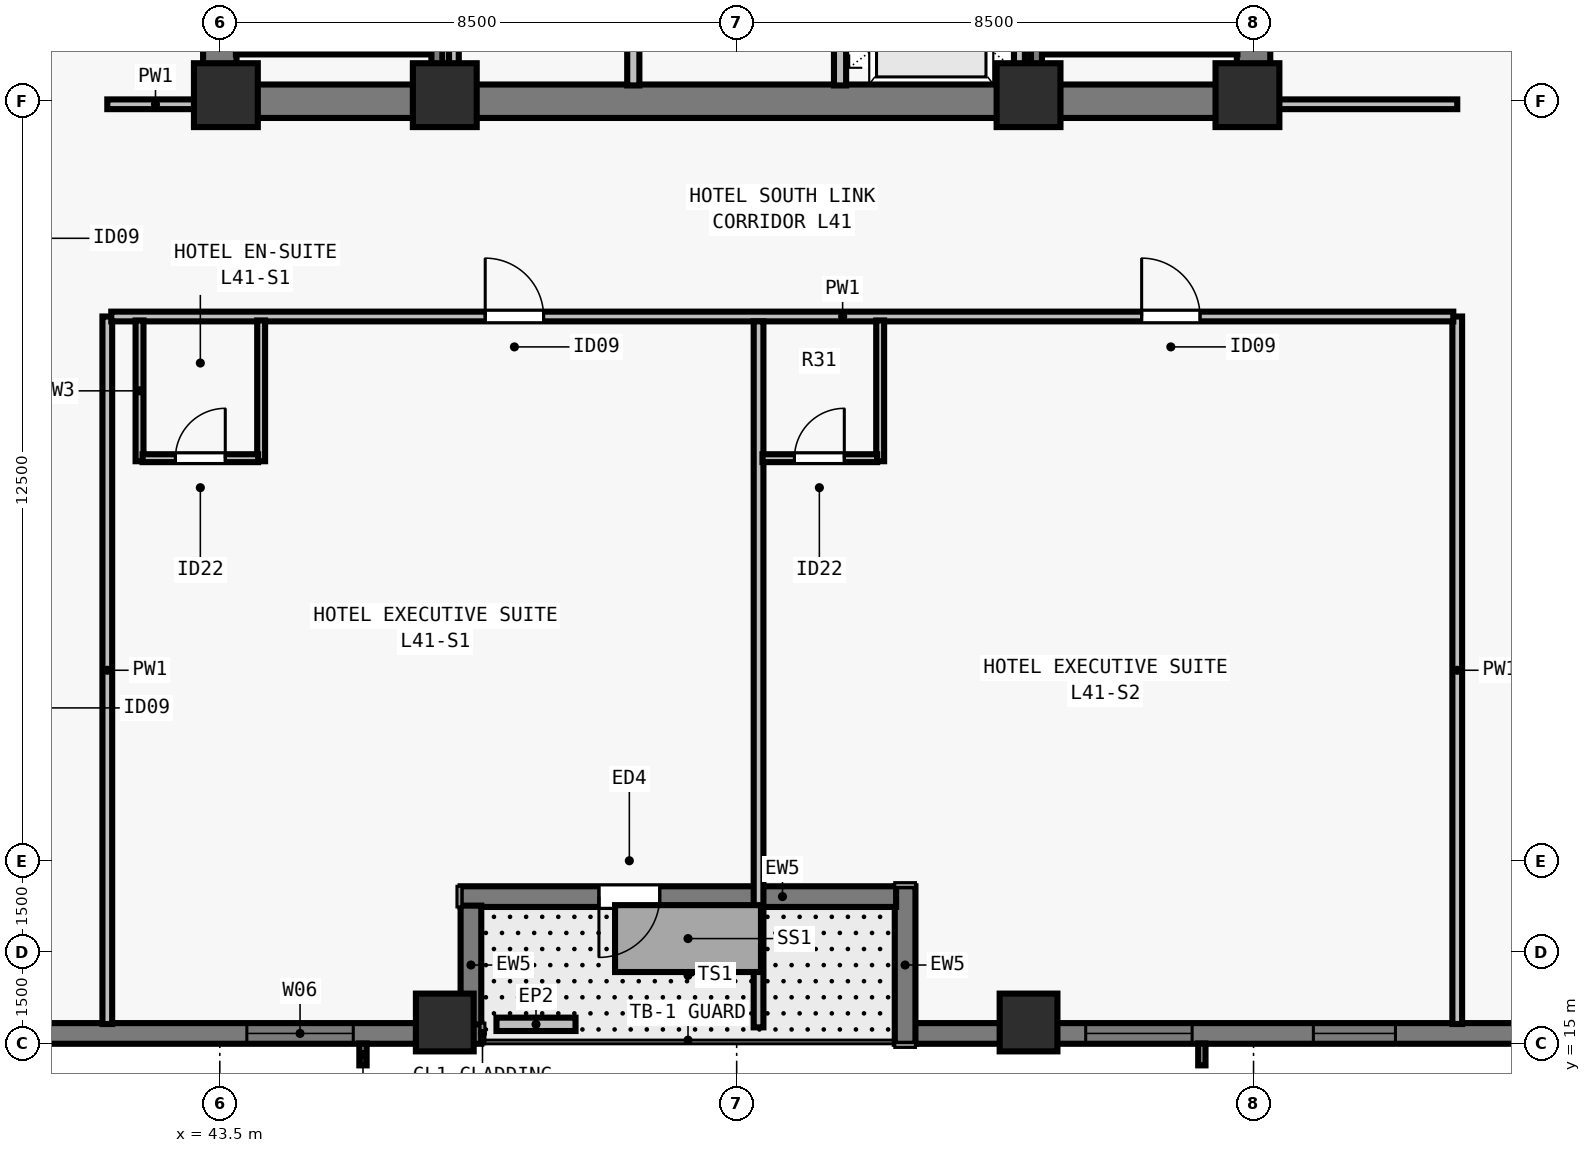
"""IFC4 building model, lengths in metres.
Left out: names, types, materials, properties, quantities, classifications, styles, units other than length and angle.
Written with IfcOpenShell. Run it as: python <this file> out.ifc"""

import sys

from ifc_helpers import new_model, si_unit, direction, frame, frame_2d, origin, origin_2d, place, context, subcontext, project, spatial, rectangle, extrude, element, fill, save


model = new_model("IFC4")
c1 = context("Model", 3, precision=1e-05, world=origin(), true_north=direction((0.0, 1.0)))
c2 = subcontext(c1, "Body", "Model", "MODEL_VIEW")
j1 = project(units=[si_unit("LENGTHUNIT", "METRE"), si_unit("PLANEANGLEUNIT", "RADIAN")], contexts=[c1])
p1 = place(None, origin())
s1 = spatial("IfcSite", under=j1, at=p1, CompositionType="ELEMENT")
p2 = place(p1, origin())
s2 = spatial("IfcBuilding", under=s1, at=p2, CompositionType="ELEMENT")
p3 = place(p2, frame((0.0, 0.0, 151.5)))
s3 = spatial("IfcBuildingStorey", under=s2, at=p3, CompositionType="ELEMENT", Elevation=151.5)
for number, where, z_axis, x_axis in (
    (1, (43.6, 30.6, 0.0), (0.0, 0.0, 1.0), (1.0, 0.0, 0.0)),
    (2, (47.2, 30.6, 0.0), (0.0, 0.0, 1.0), (1.0, 0.0, 0.0)),
    (3, (56.8, 30.6, 0.0), (0.0, 0.0, 1.0), (1.0, 0.0, 0.0)),
    (4, (60.4, 30.6, 0.0), (0.0, 0.0, 1.0), (1.0, 0.0, 0.0)),
):
    element("IfcColumn", number, at=place(p3, frame(where, z_axis=z_axis, x_axis=x_axis)), inside=s3, PredefinedType="COLUMN", context=c2, shape_type="SweptSolid", body=[
        extrude(rectangle(XDim=1.05, YDim=1.05, at=origin_2d()), origin(), (0.0, 0.0, 1.0), 3.5),
    ])
for number, where, z_axis, x_axis in (
    (5, (47.2, 15.35, 0.0), (0.0, 0.0, 1.0), (1.0, 0.0, 0.0)),
    (6, (56.8, 15.35, 0.0), (0.0, 0.0, 1.0), (1.0, 0.0, 0.0)),
):
    element("IfcColumn", number, at=place(p3, frame(where, z_axis=z_axis, x_axis=x_axis)), inside=s3, PredefinedType="COLUMN", context=c2, shape_type="SweptSolid", body=[
        extrude(rectangle(XDim=0.95, YDim=0.95, at=origin_2d()), origin(), (0.0, 0.0, 1.0), 3.5),
    ])
p4 = place(p3, frame((47.8, 15.17, 0.0), z_axis=(0.0, 0.0, 1.0), x_axis=(-1.0, 0.0, 0.0)))
e7 = element("IfcWall", 7, at=p4, inside=s3, PredefinedType="SOLIDWALL", context=c2, shape_type="SweptSolid", body=[
    extrude(rectangle(XDim=15.482, YDim=0.34, at=frame_2d((7.741, 0.0))), origin(), (0.0, 0.0, 1.0), 3.28),
])
p5 = place(p4, frame((2.105, 0.0, 0.8)))
e8 = element("IfcOpeningElement", 8, at=p5, cuts=e7, PredefinedType="OPENING", context=c2, shape_type="SweptSolid", body=[
    extrude(rectangle(XDim=1.75, YDim=1.66, at=frame_2d((0.875, 0.83))), frame((0.0, 0.18, 0.0), z_axis=(0.0, -1.0, 0.0), x_axis=(1.0, 0.0, 0.0)), (0.0, 0.0, 1.0), 0.36),
])
p6 = place(p4, frame((8.63, 0.0, 0.8)))
e9 = element("IfcOpeningElement", 9, at=p6, cuts=e7, PredefinedType="OPENING", context=c2, shape_type="SweptSolid", body=[
    extrude(rectangle(XDim=0.9, YDim=1.66, at=frame_2d((0.45, 0.83))), frame((0.0, 0.18, 0.0), z_axis=(0.0, -1.0, 0.0), x_axis=(1.0, 0.0, 0.0)), (0.0, 0.0, 1.0), 0.36),
])
p7 = place(p3, frame((72.0, 15.17, 0.0), z_axis=(0.0, 0.0, 1.0), x_axis=(-1.0, 0.0, 0.0)))
e10 = element("IfcWall", 10, at=p7, inside=s3, PredefinedType="SOLIDWALL", context=c2, shape_type="SweptSolid", body=[
    extrude(rectangle(XDim=17.082, YDim=0.34, at=frame_2d((8.541, 0.0))), origin(), (0.0, 0.0, 1.0), 3.28),
])
p8 = place(p7, frame((9.166, 0.0, 0.8)))
e11 = element("IfcOpeningElement", 11, at=p8, cuts=e10, PredefinedType="OPENING", context=c2, shape_type="SweptSolid", body=[
    extrude(rectangle(XDim=1.35, YDim=1.66, at=frame_2d((0.675, 0.83))), frame((0.0, 0.18, 0.0), z_axis=(0.0, -1.0, 0.0), x_axis=(1.0, 0.0, 0.0)), (0.0, 0.0, 1.0), 0.36),
])
p9 = place(p7, frame((12.51, 0.0, 0.8)))
e12 = element("IfcOpeningElement", 12, at=p9, cuts=e10, PredefinedType="OPENING", context=c2, shape_type="SweptSolid", body=[
    extrude(rectangle(XDim=1.75, YDim=1.66, at=frame_2d((0.875, 0.83))), frame((0.0, 0.18, 0.0), z_axis=(0.0, -1.0, 0.0), x_axis=(1.0, 0.0, 0.0)), (0.0, 0.0, 1.0), 0.36),
])
p10 = place(p3, frame((54.77, 15.0, 0.0), z_axis=(0.0, 0.0, 1.0), x_axis=(0.0, 1.0, 0.0)))
e13 = element("IfcWall", 13, at=p10, inside=s3, PredefinedType="SOLIDWALL", context=c2, shape_type="SweptSolid", body=[
    extrude(rectangle(XDim=2.59, YDim=0.34, at=frame_2d((1.295, 0.0))), origin(), (0.0, 0.0, 1.0), 3.28),
])
p11 = place(p3, frame((54.622, 17.42, 0.0), z_axis=(0.0, 0.0, 1.0), x_axis=(-1.0, 0.0, 0.0)))
e14 = element("IfcWall", 14, at=p11, inside=s3, PredefinedType="SOLIDWALL", context=c2, shape_type="SweptSolid", body=[
    extrude(rectangle(XDim=7.162, YDim=0.34, at=frame_2d((3.581, 0.0))), origin(), (0.0, 0.0, 1.0), 3.28),
])
p12 = place(p11, frame((3.887, 0.0, 0.0)))
e15 = element("IfcOpeningElement", 15, at=p12, cuts=e14, PredefinedType="OPENING", context=c2, shape_type="SweptSolid", body=[
    extrude(rectangle(XDim=1.0, YDim=2.15, at=frame_2d((0.5, 1.075))), frame((0.0, 0.18, 0.0), z_axis=(0.0, -1.0, 0.0), x_axis=(1.0, 0.0, 0.0)), (0.0, 0.0, 1.0), 0.36),
])
p13 = place(p3, frame((47.63, 17.272, 0.0), z_axis=(0.0, 0.0, 1.0), x_axis=(0.0, -1.0, 0.0)))
e16 = element("IfcWall", 16, at=p13, inside=s3, PredefinedType="SOLIDWALL", context=c2, shape_type="SweptSolid", body=[
    extrude(rectangle(XDim=1.954, YDim=0.34, at=frame_2d((0.977, 0.0))), origin(), (0.0, 0.0, 1.0), 3.28),
])
p14 = place(p3, frame((48.05, 15.32, 0.0), z_axis=(0.0, 0.0, 1.0), x_axis=(1.0, 0.0, 0.0)))
e17 = element("IfcWall", 17, at=p14, inside=s3, PredefinedType="PARAPET", context=c2, shape_type="SweptSolid", body=[
    extrude(rectangle(XDim=1.3, YDim=0.22, at=frame_2d((0.65, 0.0))), origin(), (0.0, 0.0, 1.0), 0.55),
])
p15 = place(p3, frame((43.225, 30.5, 0.0), z_axis=(0.0, 0.0, 1.0), x_axis=(1.0, 0.0, 0.0)))
e18 = element("IfcWall", 18, at=p15, inside=s3, PredefinedType="SHEAR", context=c2, shape_type="SweptSolid", body=[
    extrude(rectangle(XDim=17.55, YDim=0.55, at=frame_2d((8.775, 0.0))), origin(), (0.0, 0.0, 1.0), 3.28),
])
for number, where, z_axis, x_axis in (
    (19, (43.5, 30.765, 0.0), (0.0, 0.0, 1.0), (0.0, 1.0, 0.0)),
    (20, (60.5, 30.765, 0.0), (0.0, 0.0, 1.0), (0.0, 1.0, 0.0)),
):
    element("IfcWall", number, at=place(p3, frame(where, z_axis=z_axis, x_axis=x_axis)), inside=s3, PredefinedType="SHEAR", context=c2, shape_type="SweptSolid", body=[
        extrude(rectangle(XDim=7.985, YDim=0.55, at=frame_2d((3.993, 0.0))), origin(), (0.0, 0.0, 1.0), 3.28),
    ])
p16 = place(p3, frame((50.3, 30.76, 0.0), z_axis=(0.0, 0.0, 1.0), x_axis=(0.0, 1.0, 0.0)))
e21 = element("IfcWall", 21, at=p16, inside=s3, PredefinedType="SOLIDWALL", context=c2, shape_type="SweptSolid", body=[
    extrude(rectangle(XDim=7.855, YDim=0.2, at=frame_2d((3.927, 0.0))), origin(), (0.0, 0.0, 1.0), 3.28),
])
p17 = place(p16, frame((1.34, 0.0, 0.0)))
e22 = element("IfcOpeningElement", 22, at=p17, cuts=e21, PredefinedType="OPENING", context=c2, shape_type="SweptSolid", body=[
    extrude(rectangle(XDim=0.9, YDim=2.12, at=frame_2d((0.45, 1.06))), frame((0.0, 0.11, 0.0), z_axis=(0.0, -1.0, 0.0), x_axis=(1.0, 0.0, 0.0)), (0.0, 0.0, 1.0), 0.22),
])
p18 = place(p16, frame((5.34, 0.0, 0.0)))
e23 = element("IfcOpeningElement", 23, at=p18, cuts=e21, PredefinedType="OPENING", context=c2, shape_type="SweptSolid", body=[
    extrude(rectangle(XDim=0.9, YDim=2.12, at=frame_2d((0.45, 1.06))), frame((0.0, 0.11, 0.0), z_axis=(0.0, -1.0, 0.0), x_axis=(1.0, 0.0, 0.0)), (0.0, 0.0, 1.0), 0.22),
])
p19 = place(p3, frame((53.7, 30.76, 0.0), z_axis=(0.0, 0.0, 1.0), x_axis=(0.0, 1.0, 0.0)))
e24 = element("IfcWall", 24, at=p19, inside=s3, PredefinedType="SOLIDWALL", context=c2, shape_type="SweptSolid", body=[
    extrude(rectangle(XDim=7.855, YDim=0.2, at=frame_2d((3.927, 0.0))), origin(), (0.0, 0.0, 1.0), 3.28),
])
p20 = place(p19, frame((0.79, 0.0, 0.0)))
e25 = element("IfcOpeningElement", 25, at=p20, cuts=e24, PredefinedType="OPENING", context=c2, shape_type="SweptSolid", body=[
    extrude(rectangle(XDim=1.1, YDim=2.2, at=frame_2d((0.55, 1.1))), frame((0.0, 0.11, 0.0), z_axis=(0.0, -1.0, 0.0), x_axis=(1.0, 0.0, 0.0)), (0.0, 0.0, 1.0), 0.22),
])
p21 = place(p19, frame((3.49, 0.0, 0.0)))
e26 = element("IfcOpeningElement", 26, at=p21, cuts=e24, PredefinedType="OPENING", context=c2, shape_type="SweptSolid", body=[
    extrude(rectangle(XDim=1.1, YDim=2.2, at=frame_2d((0.55, 1.1))), frame((0.0, 0.11, 0.0), z_axis=(0.0, -1.0, 0.0), x_axis=(1.0, 0.0, 0.0)), (0.0, 0.0, 1.0), 0.22),
])
p22 = place(p19, frame((6.19, 0.0, 0.0)))
e27 = element("IfcOpeningElement", 27, at=p22, cuts=e24, PredefinedType="OPENING", context=c2, shape_type="SweptSolid", body=[
    extrude(rectangle(XDim=1.1, YDim=2.2, at=frame_2d((0.55, 1.1))), frame((0.0, 0.11, 0.0), z_axis=(0.0, -1.0, 0.0), x_axis=(1.0, 0.0, 0.0)), (0.0, 0.0, 1.0), 0.22),
])
p23 = place(p3, frame((47.35, 30.76, 0.0), z_axis=(0.0, 0.0, 1.0), x_axis=(0.0, 1.0, 0.0)))
e28 = element("IfcWall", 28, at=p23, inside=s3, PredefinedType="PARTITIONING", context=c2, shape_type="SweptSolid", body=[
    extrude(rectangle(XDim=7.855, YDim=0.16, at=frame_2d((3.927, 0.0))), origin(), (0.0, 0.0, 1.0), 3.28),
])
p24 = place(p3, frame((56.65, 30.76, 0.0), z_axis=(0.0, 0.0, 1.0), x_axis=(0.0, 1.0, 0.0)))
e29 = element("IfcWall", 29, at=p24, inside=s3, PredefinedType="SOLIDWALL", context=c2, shape_type="SweptSolid", body=[
    extrude(rectangle(XDim=7.855, YDim=0.18, at=frame_2d((3.927, 0.0))), origin(), (0.0, 0.0, 1.0), 3.28),
])
p25 = place(p3, frame((41.65, 15.325, 0.0), z_axis=(0.0, 0.0, 1.0), x_axis=(0.0, 1.0, 0.0)))
e30 = element("IfcWall", 30, at=p25, inside=s3, PredefinedType="PARTITIONING", context=c2, shape_type="SweptSolid", body=[
    extrude(rectangle(XDim=11.635, YDim=0.16, at=frame_2d((5.817, 0.0))), origin(), (0.0, 0.0, 1.0), 3.28),
])
p26 = place(p3, frame((41.65, 30.45, 0.0), z_axis=(0.0, 0.0, 1.0), x_axis=(1.0, 0.0, 0.0)))
e31 = element("IfcWall", 31, at=p26, inside=s3, PredefinedType="PARTITIONING", context=c2, shape_type="SweptSolid", body=[
    extrude(rectangle(XDim=1.585, YDim=0.16, at=frame_2d((0.792, 0.0))), origin(), (0.0, 0.0, 1.0), 3.28),
])
p27 = place(p3, frame((63.85, 15.325, 0.0), z_axis=(0.0, 0.0, 1.0), x_axis=(0.0, 1.0, 0.0)))
e32 = element("IfcWall", 32, at=p27, inside=s3, PredefinedType="PARTITIONING", context=c2, shape_type="SweptSolid", body=[
    extrude(rectangle(XDim=11.635, YDim=0.16, at=frame_2d((5.817, 0.0))), origin(), (0.0, 0.0, 1.0), 2.555),
])
p28 = place(p3, frame((60.765, 30.45, 0.0), z_axis=(0.0, 0.0, 1.0), x_axis=(1.0, 0.0, 0.0)))
e33 = element("IfcWall", 33, at=p28, inside=s3, PredefinedType="PARTITIONING", context=c2, shape_type="SweptSolid", body=[
    extrude(rectangle(XDim=3.085, YDim=0.16, at=frame_2d((1.542, 0.0))), origin(), (0.0, 0.0, 1.0), 3.28),
])
p29 = place(p3, frame((41.715, 26.96, 0.0), z_axis=(0.0, 0.0, 1.0), x_axis=(1.0, 0.0, 0.0)))
e34 = element("IfcWall", 34, at=p29, inside=s3, PredefinedType="PARTITIONING", context=c2, shape_type="SweptSolid", body=[
    extrude(rectangle(XDim=22.07, YDim=0.16, at=frame_2d((11.035, 0.0))), origin(), (0.0, 0.0, 1.0), 3.28),
])
p30 = place(p29, frame((6.15, 0.0, 0.0)))
e35 = element("IfcOpeningElement", 35, at=p30, cuts=e34, PredefinedType="OPENING", context=c2, shape_type="SweptSolid", body=[
    extrude(rectangle(XDim=0.96, YDim=2.15, at=frame_2d((0.48, 1.075))), frame((0.0, 0.09, 0.0), z_axis=(0.0, -1.0, 0.0), x_axis=(1.0, 0.0, 0.0)), (0.0, 0.0, 1.0), 0.18),
])
p31 = place(p29, frame((16.945, 0.0, 0.0)))
e36 = element("IfcOpeningElement", 36, at=p31, cuts=e34, PredefinedType="OPENING", context=c2, shape_type="SweptSolid", body=[
    extrude(rectangle(XDim=0.96, YDim=2.15, at=frame_2d((0.48, 1.075))), frame((0.0, 0.09, 0.0), z_axis=(0.0, -1.0, 0.0), x_axis=(1.0, 0.0, 0.0)), (0.0, 0.0, 1.0), 0.18),
])
for number, where, z_axis, x_axis in (
    (37, (42.18, 24.58, 0.0), (0.0, 0.0, 1.0), (0.0, 1.0, 0.0)),
    (38, (44.18, 24.58, 0.0), (0.0, 0.0, 1.0), (0.0, 1.0, 0.0)),
):
    element("IfcWall", number, at=place(p3, frame(where, z_axis=z_axis, x_axis=x_axis)), inside=s3, PredefinedType="PLUMBINGWALL", context=c2, shape_type="SweptSolid", body=[
        extrude(rectangle(XDim=2.315, YDim=0.13, at=frame_2d((1.157, 0.0))), origin(), (0.0, 0.0, 1.0), 3.28),
    ])
p32 = place(p3, frame((42.23, 24.63, 0.0), z_axis=(0.0, 0.0, 1.0), x_axis=(1.0, 0.0, 0.0)))
e39 = element("IfcWall", 39, at=p32, inside=s3, PredefinedType="PLUMBINGWALL", context=c2, shape_type="SweptSolid", body=[
    extrude(rectangle(XDim=1.9, YDim=0.13, at=frame_2d((0.95, 0.0))), origin(), (0.0, 0.0, 1.0), 3.28),
])
p33 = place(p32, frame((0.54, 0.0, 0.0)))
e40 = element("IfcOpeningElement", 40, at=p33, cuts=e39, PredefinedType="OPENING", context=c2, shape_type="SweptSolid", body=[
    extrude(rectangle(XDim=0.82, YDim=2.1, at=frame_2d((0.41, 1.05))), frame((0.0, 0.075, 0.0), z_axis=(0.0, -1.0, 0.0), x_axis=(1.0, 0.0, 0.0)), (0.0, 0.0, 1.0), 0.15),
])
p34 = place(p3, frame((52.36, 15.27, 0.0), z_axis=(0.0, 0.0, 1.0), x_axis=(0.0, 1.0, 0.0)))
e41 = element("IfcWall", 41, at=p34, inside=s3, PredefinedType="PARTITIONING", context=c2, shape_type="SweptSolid", body=[
    extrude(rectangle(XDim=11.61, YDim=0.16, at=frame_2d((5.805, 0.0))), origin(), (0.0, 0.0, 1.0), 2.896),
])
p35 = place(p3, frame((54.36, 24.58, 0.0), z_axis=(0.0, 0.0, 1.0), x_axis=(0.0, 1.0, 0.0)))
e42 = element("IfcWall", 42, at=p35, inside=s3, PredefinedType="PLUMBINGWALL", context=c2, shape_type="SweptSolid", body=[
    extrude(rectangle(XDim=2.315, YDim=0.13, at=frame_2d((1.157, 0.0))), origin(), (0.0, 0.0, 1.0), 2.896),
])
p36 = place(p3, frame((52.425, 24.63, 0.0), z_axis=(0.0, 0.0, 1.0), x_axis=(1.0, 0.0, 0.0)))
e43 = element("IfcWall", 43, at=p36, inside=s3, PredefinedType="PLUMBINGWALL", context=c2, shape_type="SweptSolid", body=[
    extrude(rectangle(XDim=1.885, YDim=0.13, at=frame_2d((0.942, 0.0))), origin(), (0.0, 0.0, 1.0), 3.28),
])
p37 = place(p36, frame((0.525, 0.0, 0.0)))
e44 = element("IfcOpeningElement", 44, at=p37, cuts=e43, PredefinedType="OPENING", context=c2, shape_type="SweptSolid", body=[
    extrude(rectangle(XDim=0.82, YDim=2.1, at=frame_2d((0.41, 1.05))), frame((0.0, 0.075, 0.0), z_axis=(0.0, -1.0, 0.0), x_axis=(1.0, 0.0, 0.0)), (0.0, 0.0, 1.0), 0.15),
])
p38 = place(p3, frame((43.765, 31.36, 0.0), z_axis=(0.0, 0.0, 1.0), x_axis=(1.0, 0.0, 0.0)))
e45 = element("IfcWall", 45, at=p38, inside=s3, PredefinedType="SOLIDWALL", context=c2, shape_type="SweptSolid", body=[
    extrude(rectangle(XDim=3.23, YDim=0.18, at=frame_2d((1.615, 0.0))), origin(), (0.0, 0.0, 1.0), 3.28),
])
p39 = place(p3, frame((47.07, 38.78, 0.0), z_axis=(0.0, 0.0, 1.0), x_axis=(0.0, -1.0, 0.0)))
e46 = element("IfcWall", 46, at=p39, inside=s3, PredefinedType="SOLIDWALL", context=c2, shape_type="SweptSolid", body=[
    extrude(rectangle(XDim=8.017, YDim=0.18, at=frame_2d((4.009, 0.0))), origin(), (0.0, 0.0, 1.0), 3.28),
])
p40 = place(p3, frame((57.005, 31.36, 0.0), z_axis=(0.0, 0.0, 1.0), x_axis=(1.0, 0.0, 0.0)))
e47 = element("IfcWall", 47, at=p40, inside=s3, PredefinedType="SOLIDWALL", context=c2, shape_type="SweptSolid", body=[
    extrude(rectangle(XDim=3.23, YDim=0.18, at=frame_2d((1.615, 0.0))), origin(), (0.0, 0.0, 1.0), 3.28),
])
p41 = place(p3, frame((56.93, 38.78, 0.0), z_axis=(0.0, 0.0, 1.0), x_axis=(0.0, -1.0, 0.0)))
e48 = element("IfcWall", 48, at=p41, inside=s3, PredefinedType="SOLIDWALL", context=c2, shape_type="SweptSolid", body=[
    extrude(rectangle(XDim=8.017, YDim=0.18, at=frame_2d((4.009, 0.0))), origin(), (0.0, 0.0, 1.0), 3.28),
])
p42 = place(p5, origin())
e49 = element("IfcWindow", 49, at=p42, inside=s3, PartitioningType="SINGLE_PANEL", PredefinedType="WINDOW", context=c2, shape_type="SweptSolid", body=[
    extrude(rectangle(XDim=1.75, YDim=1.66, at=frame_2d((0.875, 0.83))), frame((0.0, -0.05, 0.0), z_axis=(0.0, -1.0, 0.0), x_axis=(1.0, 0.0, 0.0)), (0.0, 0.0, 1.0), 0.06),
])
fill(e8, e49)
p43 = place(p8, origin())
e50 = element("IfcWindow", 50, at=p43, inside=s3, PartitioningType="SINGLE_PANEL", PredefinedType="WINDOW", context=c2, shape_type="SweptSolid", body=[
    extrude(rectangle(XDim=1.35, YDim=1.66, at=frame_2d((0.675, 0.83))), frame((0.0, -0.05, 0.0), z_axis=(0.0, -1.0, 0.0), x_axis=(1.0, 0.0, 0.0)), (0.0, 0.0, 1.0), 0.06),
])
fill(e11, e50)
p44 = place(p9, origin())
e51 = element("IfcWindow", 51, at=p44, inside=s3, PartitioningType="SINGLE_PANEL", PredefinedType="WINDOW", context=c2, shape_type="SweptSolid", body=[
    extrude(rectangle(XDim=1.75, YDim=1.66, at=frame_2d((0.875, 0.83))), frame((0.0, -0.05, 0.0), z_axis=(0.0, -1.0, 0.0), x_axis=(1.0, 0.0, 0.0)), (0.0, 0.0, 1.0), 0.06),
])
fill(e12, e51)
p45 = place(p12, origin())
e52 = element("IfcDoor", 52, at=p45, inside=s3, OperationType="SINGLE_SWING_RIGHT", PredefinedType="DOOR", context=c2, shape_type="SweptSolid", body=[
    extrude(rectangle(XDim=1.0, YDim=2.15, at=frame_2d((0.5, 1.075))), frame((0.0, 0.025, 0.0), z_axis=(0.0, -1.0, 0.0), x_axis=(1.0, 0.0, 0.0)), (0.0, 0.0, 1.0), 0.05),
])
fill(e15, e52)
p46 = place(p33, origin())
e53 = element("IfcDoor", 53, at=p46, inside=s3, OperationType="SINGLE_SWING_RIGHT", PredefinedType="DOOR", context=c2, shape_type="SweptSolid", body=[
    extrude(rectangle(XDim=0.82, YDim=2.1, at=frame_2d((0.41, 1.05))), frame((0.0, 0.025, 0.0), z_axis=(0.0, -1.0, 0.0), x_axis=(1.0, 0.0, 0.0)), (0.0, 0.0, 1.0), 0.05),
])
fill(e40, e53)
p47 = place(p30, origin())
e54 = element("IfcDoor", 54, at=p47, inside=s3, OperationType="SINGLE_SWING_LEFT", PredefinedType="DOOR", context=c2, shape_type="SweptSolid", body=[
    extrude(rectangle(XDim=0.96, YDim=2.15, at=frame_2d((0.48, 1.075))), frame((0.0, 0.025, 0.0), z_axis=(0.0, -1.0, 0.0), x_axis=(1.0, 0.0, 0.0)), (0.0, 0.0, 1.0), 0.05),
])
fill(e35, e54)
p48 = place(p37, origin())
e55 = element("IfcDoor", 55, at=p48, inside=s3, OperationType="SINGLE_SWING_RIGHT", PredefinedType="DOOR", context=c2, shape_type="SweptSolid", body=[
    extrude(rectangle(XDim=0.82, YDim=2.1, at=frame_2d((0.41, 1.05))), frame((0.0, 0.025, 0.0), z_axis=(0.0, -1.0, 0.0), x_axis=(1.0, 0.0, 0.0)), (0.0, 0.0, 1.0), 0.05),
])
fill(e44, e55)
p49 = place(p31, origin())
e56 = element("IfcDoor", 56, at=p49, inside=s3, OperationType="SINGLE_SWING_LEFT", PredefinedType="DOOR", context=c2, shape_type="SweptSolid", body=[
    extrude(rectangle(XDim=0.96, YDim=2.15, at=frame_2d((0.48, 1.075))), frame((0.0, 0.025, 0.0), z_axis=(0.0, -1.0, 0.0), x_axis=(1.0, 0.0, 0.0)), (0.0, 0.0, 1.0), 0.05),
])
fill(e36, e56)
save(model, sys.argv[1])
